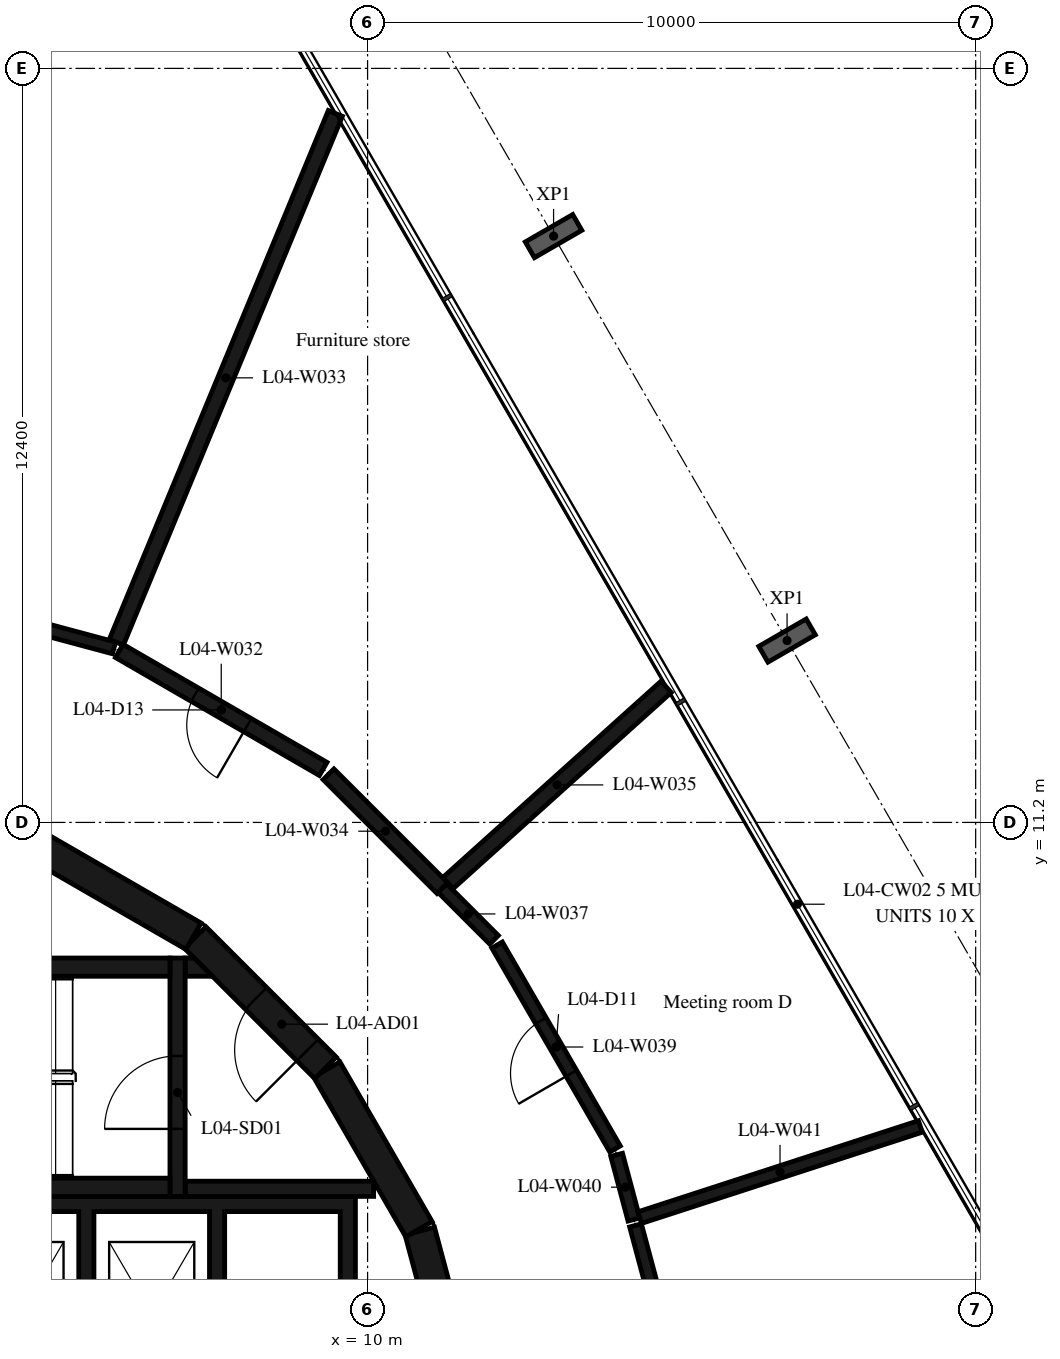
"""IFC4 building model, lengths in metres.
Left out: names, types, materials, properties, quantities, classifications, styles, units other than length and angle.
Written with IfcOpenShell. Run it as: python <this file> out.ifc"""

import sys

from ifc_helpers import new_model, si_unit, direction, frame, frame_2d, origin, origin_2d, place, context, subcontext, project, spatial, polyline, rectangle, i_section, outline, extrude, element, fill, save


model = new_model("IFC4")
c1 = context("Model", 3, precision=1e-05, world=origin(), true_north=direction((0.0, 1.0)))
c2 = subcontext(c1, "Body", "Model", "MODEL_VIEW")
j1 = project(units=[si_unit("LENGTHUNIT", "METRE"), si_unit("PLANEANGLEUNIT", "RADIAN")], contexts=[c1])
p1 = place(None, origin())
s1 = spatial("IfcSite", under=j1, at=p1, CompositionType="ELEMENT")
p2 = place(p1, origin())
s2 = spatial("IfcBuilding", under=s1, at=p2, CompositionType="ELEMENT")
p3 = place(p2, frame((0.0, 0.0, 23.4)))
s3 = spatial("IfcBuildingStorey", under=s2, at=p3, CompositionType="ELEMENT", Elevation=23.4)
for number, where, z_axis, x_axis in (
    (1, (16.899, 14.19, -0.38), (0.0, 0.0, 1.0), (0.5, -0.866, 0.0)),
    (2, (13.059, 20.842, -0.38), (0.0, 0.0, 1.0), (0.5, -0.866, 0.0)),
):
    element("IfcColumn", number, at=place(p3, frame(where, z_axis=z_axis, x_axis=x_axis)), inside=s3, PredefinedType="COLUMN", context=c2, shape_type="SweptSolid", body=[
        extrude(i_section(OverallWidth=0.3, OverallDepth=0.9, WebThickness=0.019, FlangeThickness=0.035, FilletRadius=0.03, at=origin_2d()), origin(), (0.0, 0.0, 1.0), 4.8),
    ])
for number, where, z_axis, x_axis in (
    (3, (11.643, 1.55, 0.0), (0.0, 0.0, 1.0), (-0.259, 0.966, 0.0)),
    (4, (10.845, 4.51, 0.0), (0.0, 0.0, 1.0), (-0.5, 0.866, 0.0)),
):
    element("IfcWall", number, at=place(p3, frame(where, z_axis=z_axis, x_axis=x_axis)), inside=s3, PredefinedType="SHEAR", context=c2, shape_type="SweptSolid", body=[
        extrude(rectangle(XDim=3.033, YDim=0.5, at=frame_2d((1.516, 0.0))), origin(), (0.0, 0.0, 1.0), 4.42),
    ])
p4 = place(p3, frame((9.308, 7.164, 0.0), z_axis=(0.0, 0.0, 1.0), x_axis=(-0.707106781187, 0.707106781187, 0.0)))
e5 = element("IfcWall", 5, at=p4, inside=s3, PredefinedType="SHEAR", context=c2, shape_type="SweptSolid", body=[
    extrude(rectangle(XDim=3.032, YDim=0.5, at=frame_2d((1.516, 0.0))), origin(), (0.0, 0.0, 1.0), 4.42),
])
p5 = place(p4, frame((0.416, 0.0, 0.0)))
e6 = element("IfcOpeningElement", 6, at=p5, cuts=e5, PredefinedType="OPENING", context=c2, shape_type="SweptSolid", body=[
    extrude(rectangle(XDim=1.2, YDim=2.1, at=frame_2d((0.6, 1.05))), frame((0.0, 0.26, 0.0), z_axis=(0.0, -1.0, 0.0), x_axis=(1.0, 0.0, 0.0)), (0.0, 0.0, 1.0), 0.52),
])
p6 = place(p3, frame((7.137, 9.329, 0.0), z_axis=(0.0, 0.0, 1.0), x_axis=(-0.865975092491, 0.500087131594, 0.0)))
e7 = element("IfcWall", 7, at=p6, inside=s3, PredefinedType="SHEAR", context=c2, shape_type="SweptSolid", body=[
    extrude(rectangle(XDim=3.033, YDim=0.5, at=frame_2d((1.516, 0.0))), origin(), (0.0, 0.0, 1.0), 4.42),
])
for number, where, z_axis, x_axis in (
    (8, (0.0, 5.2, 0.0), (0.0, 0.0, 1.0), (1.0, 0.0, 0.0)),
    (9, (0.0, 8.82, 0.0), (0.0, 0.0, 1.0), (1.0, 0.0, 0.0)),
):
    element("IfcWall", number, at=place(p3, frame(where, z_axis=z_axis, x_axis=x_axis)), inside=s3, PredefinedType="SHEAR", context=c2, shape_type="SweptSolid", body=[
        extrude(rectangle(XDim=6.75, YDim=0.3, at=frame_2d((3.375, 0.0))), origin(), (0.0, 0.0, 1.0), 4.42),
    ])
p7 = place(p3, frame((6.875, 5.05, 0.0), z_axis=(0.0, 0.0, 1.0), x_axis=(0.0, 1.0, 0.0)))
e10 = element("IfcWall", 10, at=p7, inside=s3, PredefinedType="SHEAR", context=c2, shape_type="SweptSolid", body=[
    extrude(rectangle(XDim=3.92, YDim=0.25, at=frame_2d((1.96, 0.0))), origin(), (0.0, 0.0, 1.0), 4.42),
])
p8 = place(p7, frame((1.11, 0.0, 0.0)))
e11 = element("IfcOpeningElement", 11, at=p8, cuts=e10, PredefinedType="OPENING", context=c2, shape_type="SweptSolid", body=[
    extrude(rectangle(XDim=1.2, YDim=2.1, at=frame_2d((0.6, 1.05))), frame((0.0, 0.135, 0.0), z_axis=(0.0, -1.0, 0.0), x_axis=(1.0, 0.0, 0.0)), (0.0, 0.0, 1.0), 0.27),
])
p9 = place(p3, frame((7.0, 5.175, 0.0), z_axis=(0.0, 0.0, 1.0), x_axis=(1.0, 0.0, 0.0)))
e12 = element("IfcWall", 12, at=p9, inside=s3, PredefinedType="SHEAR", context=c2, shape_type="SweptSolid", body=[
    extrude(rectangle(XDim=3.1, YDim=0.25, at=frame_2d((1.55, 0.0))), origin(), (0.0, 0.0, 1.0), 4.42),
])
p10 = place(p3, origin())
e13 = element("IfcWall", 13, at=p10, inside=s3, PredefinedType="SHEAR", context=c2, shape_type="SweptSolid", body=[
    extrude(outline(polyline([(7.448, 8.67), (7.0, 8.67), (7.0, 8.97), (7.148, 8.97), (7.448, 8.67)])), origin(), (0.0, 0.0, 1.0), 4.42),
])
p11 = place(p3, origin())
e14 = element("IfcWall", 14, at=p11, inside=s3, PredefinedType="SHEAR", context=c2, shape_type="SweptSolid", body=[
    extrude(outline(polyline([(-9.55, 4.8), (-7.65, 4.8), (-7.65, 1.9), (-7.4, 1.9), (-7.4, 4.8), (-5.5, 4.8), (-5.5, 1.9), (-5.25, 1.9), (-5.25, 4.8), (-3.35, 4.8), (-3.35, 1.9), (-3.1, 1.9), (-3.1, 4.8), (-1.2, 4.8), (-1.2, 1.9), (-0.95, 1.9), (-0.95, 4.8), (3.1, 4.8), (3.1, 1.9), (3.35, 1.9), (3.35, 4.8), (5.25, 4.8), (5.25, 1.9), (5.5, 1.9), (5.5, 4.8), (7.4, 4.8), (7.4, 1.9), (7.65, 1.9), (7.65, 4.8), (9.55, 4.8), (9.55, 1.9), (9.8, 1.9), (9.8, 4.8), (9.8, 5.05), (-9.8, 5.05), (-9.8, 4.8), (-9.8, 1.9), (-9.55, 1.9), (-9.55, 4.8)])), origin(), (0.0, 0.0, 1.0), 4.42),
])
p12 = place(p3, frame((5.83, 14.07, 0.0), z_axis=(0.0, 0.0, 1.0), x_axis=(-0.965870133458, 0.259026804199, 0.0)))
e15 = element("IfcWall", 15, at=p12, inside=s3, PredefinedType="PARTITIONING", context=c2, shape_type="SweptSolid", body=[
    extrude(rectangle(XDim=3.876, YDim=0.2, at=frame_2d((1.938, 0.0))), origin(), (0.0, 0.0, 1.0), 4.42),
])
p13 = place(p3, frame((9.27, 12.08, 0.0), z_axis=(0.0, 0.0, 1.0), x_axis=(-0.865601686425, 0.500733182901, 0.0)))
e16 = element("IfcWall", 16, at=p13, inside=s3, PredefinedType="PARTITIONING", context=c2, shape_type="SweptSolid", body=[
    extrude(rectangle(XDim=3.874, YDim=0.25, at=frame_2d((1.937, 0.0))), origin(), (0.0, 0.0, 1.0), 4.42),
])
p14 = place(p13, frame((1.437, 0.0, 0.0)))
e17 = element("IfcOpeningElement", 17, at=p14, cuts=e16, PredefinedType="OPENING", context=c2, shape_type="SweptSolid", body=[
    extrude(rectangle(XDim=1.0, YDim=2.1, at=frame_2d((0.5, 1.05))), frame((0.0, 0.135, 0.0), z_axis=(0.0, -1.0, 0.0), x_axis=(1.0, 0.0, 0.0)), (0.0, 0.0, 1.0), 0.27),
])
p15 = place(p3, frame((9.47, 22.86, 0.0), z_axis=(0.0, 0.0, 1.0), x_axis=(-0.382599926304, -0.923914117433, 0.0)))
e18 = element("IfcWall", 18, at=p15, inside=s3, PredefinedType="PARTITIONING", context=c2, shape_type="SweptSolid", body=[
    extrude(rectangle(XDim=9.414, YDim=0.25, at=frame_2d((4.707, 0.0))), origin(), (0.0, 0.0, 1.0), 4.42),
])
p16 = place(p3, frame((11.23, 10.12, 0.0), z_axis=(0.0, 0.0, 1.0), x_axis=(-0.707106781187, 0.707106781187, 0.0)))
e19 = element("IfcWall", 19, at=p16, inside=s3, PredefinedType="PARTITIONING", context=c2, shape_type="SweptSolid", body=[
    extrude(rectangle(XDim=2.647, YDim=0.25, at=frame_2d((1.323, 0.0))), origin(), (0.0, 0.0, 1.0), 4.42),
])
p17 = place(p3, frame((11.323, 10.204, 0.0), z_axis=(0.0, 0.0, 1.0), x_axis=(0.743490383827, 0.668746625529, 0.0)))
e20 = element("IfcWall", 20, at=p17, inside=s3, PredefinedType="PARTITIONING", context=c2, shape_type="SweptSolid", body=[
    extrude(rectangle(XDim=4.824, YDim=0.25, at=frame_2d((2.412, 0.0))), origin(), (0.0, 0.0, 1.0), 4.03),
])
p18 = place(p3, frame((12.08, 9.27, 0.0), z_axis=(0.0, 0.0, 1.0), x_axis=(-0.707106781187, 0.707106781187, 0.0)))
e21 = element("IfcWall", 21, at=p18, inside=s3, PredefinedType="PARTITIONING", context=c2, shape_type="SweptSolid", body=[
    extrude(rectangle(XDim=1.202, YDim=0.2, at=frame_2d((0.601, 0.0))), origin(), (0.0, 0.0, 1.0), 4.42),
])
p19 = place(p3, frame((14.07, 5.83, 0.0), z_axis=(0.0, 0.0, 1.0), x_axis=(-0.500760497952, 0.865585884642, 0.0)))
e22 = element("IfcWall", 22, at=p19, inside=s3, PredefinedType="PARTITIONING", context=c2, shape_type="SweptSolid", body=[
    extrude(rectangle(XDim=3.874, YDim=0.2, at=frame_2d((1.937, 0.0))), origin(), (0.0, 0.0, 1.0), 4.42),
])
p20 = place(p19, frame((1.437, 0.0, 0.0)))
e23 = element("IfcOpeningElement", 23, at=p20, cuts=e22, PredefinedType="OPENING", context=c2, shape_type="SweptSolid", body=[
    extrude(rectangle(XDim=1.0, YDim=2.1, at=frame_2d((0.5, 1.05))), frame((0.0, 0.11, 0.0), z_axis=(0.0, -1.0, 0.0), x_axis=(1.0, 0.0, 0.0)), (0.0, 0.0, 1.0), 0.22),
])
p21 = place(p3, frame((14.38, 4.67, 0.0), z_axis=(0.0, 0.0, 1.0), x_axis=(-0.258159565639, 0.966102292032, 0.0)))
e24 = element("IfcWall", 24, at=p21, inside=s3, PredefinedType="PARTITIONING", context=c2, shape_type="SweptSolid", body=[
    extrude(rectangle(XDim=1.101, YDim=0.2, at=frame_2d((0.55, 0.0))), origin(), (0.0, 0.0, 1.0), 4.42),
])
p22 = place(p3, frame((14.475, 4.701, 0.0), z_axis=(0.0, 0.0, 1.0), x_axis=(0.951085450377, 0.308927930239, 0.0)))
e25 = element("IfcWall", 25, at=p22, inside=s3, PredefinedType="PARTITIONING", context=c2, shape_type="SweptSolid", body=[
    extrude(rectangle(XDim=4.852, YDim=0.2, at=frame_2d((2.426, 0.0))), origin(), (0.0, 0.0, 1.0), 4.03),
])
p23 = place(p3, frame((15.074, 2.087, 0.0), z_axis=(0.0, 0.0, 1.0), x_axis=(-0.259408996071, 0.965767556277, 0.0)))
e26 = element("IfcWall", 26, at=p23, inside=s3, PredefinedType="PARTITIONING", context=c2, shape_type="SweptSolid", body=[
    extrude(rectangle(XDim=2.575, YDim=0.2, at=frame_2d((1.288, 0.0))), origin(), (0.0, 0.0, 1.0), 4.42),
])
p24 = place(p8, origin())
e27 = element("IfcDoor", 27, at=p24, inside=s3, OperationType="SINGLE_SWING_LEFT", PredefinedType="DOOR", context=c2, shape_type="SweptSolid", body=[
    extrude(rectangle(XDim=1.2, YDim=2.1, at=frame_2d((0.6, 1.05))), frame((0.0, 0.025, 0.0), z_axis=(0.0, -1.0, 0.0), x_axis=(1.0, 0.0, 0.0)), (0.0, 0.0, 1.0), 0.05),
])
fill(e11, e27)
p25 = place(p5, origin())
e28 = element("IfcDoor", 28, at=p25, inside=s3, OperationType="SINGLE_SWING_RIGHT", PredefinedType="DOOR", context=c2, shape_type="SweptSolid", body=[
    extrude(rectangle(XDim=1.2, YDim=2.1, at=frame_2d((0.6, 1.05))), frame((0.0, 0.025, 0.0), z_axis=(0.0, -1.0, 0.0), x_axis=(1.0, 0.0, 0.0)), (0.0, 0.0, 1.0), 0.05),
])
fill(e6, e28)
p26 = place(p20, origin())
e29 = element("IfcDoor", 29, at=p26, inside=s3, OperationType="SINGLE_SWING_LEFT", PredefinedType="DOOR", context=c2, shape_type="SweptSolid", body=[
    extrude(rectangle(XDim=1.0, YDim=2.1, at=frame_2d((0.5, 1.05))), frame((0.0, 0.025, 0.0), z_axis=(0.0, -1.0, 0.0), x_axis=(1.0, 0.0, 0.0)), (0.0, 0.0, 1.0), 0.05),
])
fill(e23, e29)
p27 = place(p14, origin())
e30 = element("IfcDoor", 30, at=p27, inside=s3, OperationType="SINGLE_SWING_LEFT", PredefinedType="DOOR", context=c2, shape_type="SweptSolid", body=[
    extrude(rectangle(XDim=1.0, YDim=2.1, at=frame_2d((0.5, 1.05))), frame((0.0, 0.025, 0.0), z_axis=(0.0, -1.0, 0.0), x_axis=(1.0, 0.0, 0.0)), (0.0, 0.0, 1.0), 0.05),
])
fill(e17, e30)
save(model, sys.argv[1])
